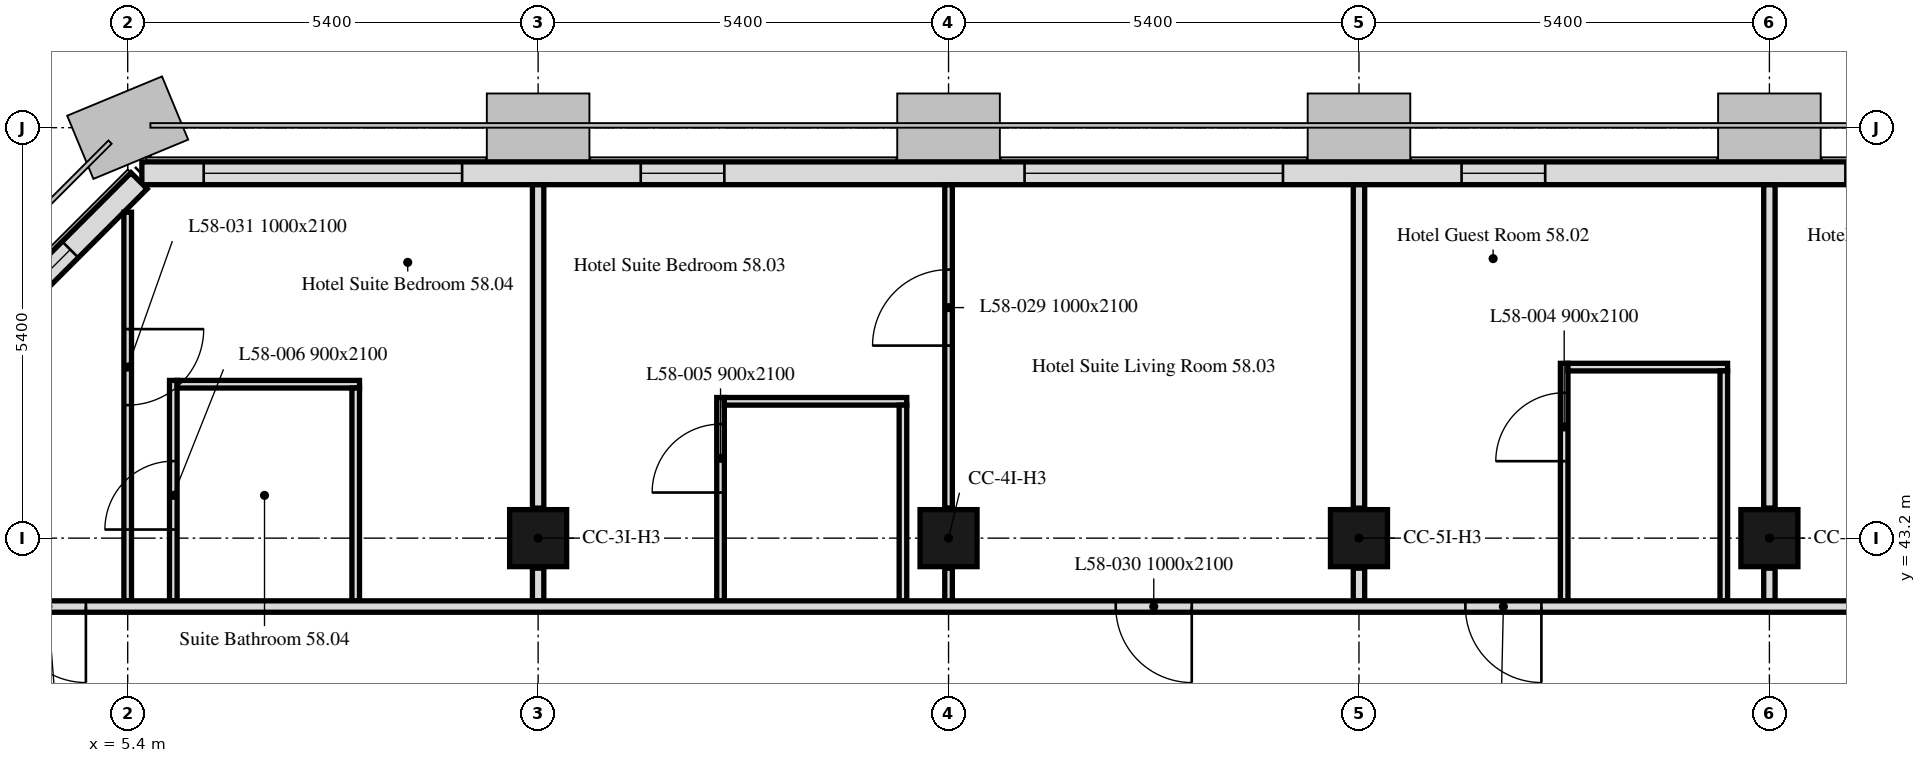
"""IFC4 building model, lengths in metres.
Left out: names, types, materials, properties, quantities, classifications, styles, units other than length and angle.
Written with IfcOpenShell. Run it as: python <this file> out.ifc"""

import sys

from ifc_helpers import new_model, si_unit, direction, frame, frame_2d, origin, origin_2d, place, context, subcontext, project, spatial, rectangle, extrude, element, fill, save


model = new_model("IFC4")
c1 = context("Model", 3, precision=1e-05, world=origin(), true_north=direction((0.0, 1.0)))
c2 = subcontext(c1, "Body", "Model", "MODEL_VIEW")
j1 = project(units=[si_unit("LENGTHUNIT", "METRE"), si_unit("PLANEANGLEUNIT", "RADIAN")], contexts=[c1])
p1 = place(None, origin())
s1 = spatial("IfcSite", under=j1, at=p1, CompositionType="ELEMENT")
p2 = place(p1, origin())
s2 = spatial("IfcBuilding", under=s1, at=p2, CompositionType="ELEMENT")
p3 = place(p2, frame((0.0, 0.0, 230.2)))
s3 = spatial("IfcBuildingStorey", under=s2, at=p3, CompositionType="ELEMENT", Elevation=230.2)
for number, where, z_axis, x_axis in (
    (1, (10.8, 43.2, 0.0), (0.0, 0.0, 1.0), (1.0, 0.0, 0.0)),
    (2, (16.2, 43.2, 0.0), (0.0, 0.0, 1.0), (1.0, 0.0, 0.0)),
    (3, (21.6, 43.2, 0.0), (0.0, 0.0, 1.0), (1.0, 0.0, 0.0)),
    (4, (27.0, 43.2, 0.0), (0.0, 0.0, 1.0), (1.0, 0.0, 0.0)),
):
    element("IfcColumn", number, at=place(p3, frame(where, z_axis=z_axis, x_axis=x_axis)), inside=s3, PredefinedType="COLUMN", context=c2, shape_type="SweptSolid", body=[
        extrude(rectangle(XDim=0.75, YDim=0.75, at=origin_2d()), origin(), (0.0, 0.0, 1.0), 2.8),
    ])
p4 = place(p3, frame((37.614, 48.0, 0.0), z_axis=(0.0, 0.0, 1.0), x_axis=(-1.0, 0.0, 0.0)))
e5 = element("IfcWall", 5, at=p4, inside=s3, PredefinedType="SOLIDWALL", context=c2, shape_type="SweptSolid", body=[
    extrude(rectangle(XDim=32.027, YDim=0.3, at=frame_2d((16.014, 0.0))), origin(), (0.0, 0.0, 1.0), 2.8),
])
p5 = place(p4, frame((2.764, 0.0, 0.9)))
e6 = element("IfcOpeningElement", 6, at=p5, cuts=e5, PredefinedType="OPENING", context=c2, shape_type="SweptSolid", body=[
    extrude(rectangle(XDim=1.1, YDim=1.7, at=frame_2d((0.55, 0.85))), frame((0.0, 0.16, 0.0), z_axis=(0.0, -1.0, 0.0), x_axis=(1.0, 0.0, 0.0)), (0.0, 0.0, 1.0), 0.32),
])
p6 = place(p4, frame((6.214, 0.0, 0.9)))
e7 = element("IfcOpeningElement", 7, at=p6, cuts=e5, PredefinedType="OPENING", context=c2, shape_type="SweptSolid", body=[
    extrude(rectangle(XDim=3.4, YDim=1.7, at=frame_2d((1.7, 0.85))), frame((0.0, 0.16, 0.0), z_axis=(0.0, -1.0, 0.0), x_axis=(1.0, 0.0, 0.0)), (0.0, 0.0, 1.0), 0.32),
])
p7 = place(p4, frame((13.564, 0.0, 0.9)))
e8 = element("IfcOpeningElement", 8, at=p7, cuts=e5, PredefinedType="OPENING", context=c2, shape_type="SweptSolid", body=[
    extrude(rectangle(XDim=1.1, YDim=1.7, at=frame_2d((0.55, 0.85))), frame((0.0, 0.16, 0.0), z_axis=(0.0, -1.0, 0.0), x_axis=(1.0, 0.0, 0.0)), (0.0, 0.0, 1.0), 0.32),
])
p8 = place(p4, frame((17.014, 0.0, 0.9)))
e9 = element("IfcOpeningElement", 9, at=p8, cuts=e5, PredefinedType="OPENING", context=c2, shape_type="SweptSolid", body=[
    extrude(rectangle(XDim=3.4, YDim=1.7, at=frame_2d((1.7, 0.85))), frame((0.0, 0.16, 0.0), z_axis=(0.0, -1.0, 0.0), x_axis=(1.0, 0.0, 0.0)), (0.0, 0.0, 1.0), 0.32),
])
p9 = place(p4, frame((24.364, 0.0, 0.9)))
e10 = element("IfcOpeningElement", 10, at=p9, cuts=e5, PredefinedType="OPENING", context=c2, shape_type="SweptSolid", body=[
    extrude(rectangle(XDim=1.1, YDim=1.7, at=frame_2d((0.55, 0.85))), frame((0.0, 0.16, 0.0), z_axis=(0.0, -1.0, 0.0), x_axis=(1.0, 0.0, 0.0)), (0.0, 0.0, 1.0), 0.32),
])
p10 = place(p4, frame((27.814, 0.0, 0.9)))
e11 = element("IfcOpeningElement", 11, at=p10, cuts=e5, PredefinedType="OPENING", context=c2, shape_type="SweptSolid", body=[
    extrude(rectangle(XDim=3.4, YDim=1.7, at=frame_2d((1.7, 0.85))), frame((0.0, 0.16, 0.0), z_axis=(0.0, -1.0, 0.0), x_axis=(1.0, 0.0, 0.0)), (0.0, 0.0, 1.0), 0.32),
])
p11 = place(p3, frame((5.55, 47.901, 0.0), z_axis=(0.0, 0.0, 1.0), x_axis=(-0.707106781187, -0.707106781187, 0.0)))
e12 = element("IfcWall", 12, at=p11, inside=s3, PredefinedType="SOLIDWALL", context=c2, shape_type="SweptSolid", body=[
    extrude(rectangle(XDim=6.86, YDim=0.3, at=frame_2d((3.43, 0.0))), origin(), (0.0, 0.0, 1.0), 2.8),
])
p12 = place(p11, frame((1.28, 0.0, 0.9)))
e13 = element("IfcOpeningElement", 13, at=p12, cuts=e12, PredefinedType="OPENING", context=c2, shape_type="SweptSolid", body=[
    extrude(rectangle(XDim=1.1, YDim=1.7, at=frame_2d((0.55, 0.85))), frame((0.0, 0.16, 0.0), z_axis=(0.0, -1.0, 0.0), x_axis=(1.0, 0.0, 0.0)), (0.0, 0.0, 1.0), 0.32),
])
p13 = place(p11, frame((4.48, 0.0, 0.9)))
e14 = element("IfcOpeningElement", 14, at=p13, cuts=e12, PredefinedType="OPENING", context=c2, shape_type="SweptSolid", body=[
    extrude(rectangle(XDim=1.1, YDim=1.7, at=frame_2d((0.55, 0.85))), frame((0.0, 0.16, 0.0), z_axis=(0.0, -1.0, 0.0), x_axis=(1.0, 0.0, 0.0)), (0.0, 0.0, 1.0), 0.32),
])
p14 = place(p3, frame((27.0, 47.849, 0.0), z_axis=(0.0, 0.0, 1.0), x_axis=(0.0, -1.0, 0.0)))
e15 = element("IfcWall", 15, at=p14, inside=s3, PredefinedType="PARTITIONING", context=c2, shape_type="SweptSolid", body=[
    extrude(rectangle(XDim=4.254, YDim=0.15, at=frame_2d((2.127, 0.0))), origin(), (0.0, 0.0, 1.0), 2.2),
])
p15 = place(p3, frame((27.0, 42.805, 0.0), z_axis=(0.0, 0.0, 1.0), x_axis=(0.0, -1.0, 0.0)))
e16 = element("IfcWall", 16, at=p15, inside=s3, PredefinedType="PARTITIONING", context=c2, shape_type="SweptSolid", body=[
    extrude(rectangle(XDim=0.43, YDim=0.15, at=frame_2d((0.215, 0.0))), origin(), (0.0, 0.0, 1.0), 2.2),
])
p16 = place(p3, frame((21.6, 47.849, 0.0), z_axis=(0.0, 0.0, 1.0), x_axis=(0.0, -1.0, 0.0)))
e17 = element("IfcWall", 17, at=p16, inside=s3, PredefinedType="PARTITIONING", context=c2, shape_type="SweptSolid", body=[
    extrude(rectangle(XDim=4.254, YDim=0.15, at=frame_2d((2.127, 0.0))), origin(), (0.0, 0.0, 1.0), 2.2),
])
p17 = place(p3, frame((21.6, 42.805, 0.0), z_axis=(0.0, 0.0, 1.0), x_axis=(0.0, -1.0, 0.0)))
e18 = element("IfcWall", 18, at=p17, inside=s3, PredefinedType="PARTITIONING", context=c2, shape_type="SweptSolid", body=[
    extrude(rectangle(XDim=0.43, YDim=0.15, at=frame_2d((0.215, 0.0))), origin(), (0.0, 0.0, 1.0), 2.2),
])
p18 = place(p3, frame((24.3, 42.375, 0.0), z_axis=(0.0, 0.0, 1.0), x_axis=(0.0, 1.0, 0.0)))
e19 = element("IfcWall", 19, at=p18, inside=s3, PredefinedType="PARTITIONING", context=c2, shape_type="SweptSolid", body=[
    extrude(rectangle(XDim=3.125, YDim=0.1, at=frame_2d((1.562, 0.0))), origin(), (0.0, 0.0, 1.0), 2.8),
])
p19 = place(p18, frame((1.837, 0.0, 0.0)))
e20 = element("IfcOpeningElement", 20, at=p19, cuts=e19, PredefinedType="OPENING", context=c2, shape_type="SweptSolid", body=[
    extrude(rectangle(XDim=0.9, YDim=2.1, at=frame_2d((0.45, 1.05))), frame((0.0, 0.05, 0.0), z_axis=(0.0, -1.0, 0.0), x_axis=(1.0, 0.0, 0.0)), (0.0, 0.0, 1.0), 0.1),
])
p20 = place(p3, frame((24.35, 45.45, 0.0), z_axis=(0.0, 0.0, 1.0), x_axis=(1.0, 0.0, 0.0)))
e21 = element("IfcWall", 21, at=p20, inside=s3, PredefinedType="PARTITIONING", context=c2, shape_type="SweptSolid", body=[
    extrude(rectangle(XDim=2.1, YDim=0.1, at=frame_2d((1.05, 0.0))), origin(), (0.0, 0.0, 1.0), 2.8),
])
p21 = place(p3, frame((26.4, 45.4, 0.0), z_axis=(0.0, 0.0, 1.0), x_axis=(0.0, -1.0, 0.0)))
e22 = element("IfcWall", 22, at=p21, inside=s3, PredefinedType="PARTITIONING", context=c2, shape_type="SweptSolid", body=[
    extrude(rectangle(XDim=3.025, YDim=0.1, at=frame_2d((1.512, 0.0))), origin(), (0.0, 0.0, 1.0), 2.8),
])
p22 = place(p3, frame((10.8, 47.849, 0.0), z_axis=(0.0, 0.0, 1.0), x_axis=(0.0, -1.0, 0.0)))
e23 = element("IfcWall", 23, at=p22, inside=s3, PredefinedType="PARTITIONING", context=c2, shape_type="SweptSolid", body=[
    extrude(rectangle(XDim=4.254, YDim=0.15, at=frame_2d((2.127, 0.0))), origin(), (0.0, 0.0, 1.0), 2.2),
])
p23 = place(p3, frame((10.8, 42.805, 0.0), z_axis=(0.0, 0.0, 1.0), x_axis=(0.0, -1.0, 0.0)))
e24 = element("IfcWall", 24, at=p23, inside=s3, PredefinedType="PARTITIONING", context=c2, shape_type="SweptSolid", body=[
    extrude(rectangle(XDim=0.43, YDim=0.15, at=frame_2d((0.215, 0.0))), origin(), (0.0, 0.0, 1.0), 2.2),
])
p24 = place(p3, frame((13.2, 42.375, 0.0), z_axis=(0.0, 0.0, 1.0), x_axis=(0.0, 1.0, 0.0)))
e25 = element("IfcWall", 25, at=p24, inside=s3, PredefinedType="PARTITIONING", context=c2, shape_type="SweptSolid", body=[
    extrude(rectangle(XDim=2.675, YDim=0.1, at=frame_2d((1.337, 0.0))), origin(), (0.0, 0.0, 1.0), 2.8),
])
p25 = place(p24, frame((1.425, 0.0, 0.0)))
e26 = element("IfcOpeningElement", 26, at=p25, cuts=e25, PredefinedType="OPENING", context=c2, shape_type="SweptSolid", body=[
    extrude(rectangle(XDim=0.9, YDim=2.1, at=frame_2d((0.45, 1.05))), frame((0.0, 0.05, 0.0), z_axis=(0.0, -1.0, 0.0), x_axis=(1.0, 0.0, 0.0)), (0.0, 0.0, 1.0), 0.1),
])
p26 = place(p3, frame((13.25, 45.0, 0.0), z_axis=(0.0, 0.0, 1.0), x_axis=(1.0, 0.0, 0.0)))
e27 = element("IfcWall", 27, at=p26, inside=s3, PredefinedType="PARTITIONING", context=c2, shape_type="SweptSolid", body=[
    extrude(rectangle(XDim=2.4, YDim=0.1, at=frame_2d((1.2, 0.0))), origin(), (0.0, 0.0, 1.0), 2.8),
])
p27 = place(p3, frame((15.6, 44.95, 0.0), z_axis=(0.0, 0.0, 1.0), x_axis=(0.0, -1.0, 0.0)))
e28 = element("IfcWall", 28, at=p27, inside=s3, PredefinedType="PARTITIONING", context=c2, shape_type="SweptSolid", body=[
    extrude(rectangle(XDim=2.575, YDim=0.1, at=frame_2d((1.288, 0.0))), origin(), (0.0, 0.0, 1.0), 2.8),
])
p28 = place(p3, frame((16.2, 42.375, 0.0), z_axis=(0.0, 0.0, 1.0), x_axis=(0.0, 1.0, 0.0)))
e29 = element("IfcWall", 29, at=p28, inside=s3, PredefinedType="PARTITIONING", context=c2, shape_type="SweptSolid", body=[
    extrude(rectangle(XDim=0.43, YDim=0.1, at=frame_2d((0.215, 0.0))), origin(), (0.0, 0.0, 1.0), 2.2),
])
p29 = place(p3, frame((16.2, 43.595, 0.0), z_axis=(0.0, 0.0, 1.0), x_axis=(0.0, 1.0, 0.0)))
e30 = element("IfcWall", 30, at=p29, inside=s3, PredefinedType="PARTITIONING", context=c2, shape_type="SweptSolid", body=[
    extrude(rectangle(XDim=4.254, YDim=0.1, at=frame_2d((2.127, 0.0))), origin(), (0.0, 0.0, 1.0), 2.2),
])
p30 = place(p29, frame((2.138, 0.0, 0.0)))
e31 = element("IfcOpeningElement", 31, at=p30, cuts=e30, PredefinedType="OPENING", context=c2, shape_type="SweptSolid", body=[
    extrude(rectangle(XDim=1.0, YDim=2.1, at=frame_2d((0.5, 1.05))), frame((0.0, 0.05, 0.0), z_axis=(0.0, -1.0, 0.0), x_axis=(1.0, 0.0, 0.0)), (0.0, 0.0, 1.0), 0.1),
])
p31 = place(p3, frame((5.4, 47.488, 0.0), z_axis=(0.0, 0.0, 1.0), x_axis=(0.0, -1.0, 0.0)))
e32 = element("IfcWall", 32, at=p31, inside=s3, PredefinedType="PARTITIONING", context=c2, shape_type="SweptSolid", body=[
    extrude(rectangle(XDim=5.113, YDim=0.1, at=frame_2d((2.556, 0.0))), origin(), (0.0, 0.0, 1.0), 2.8),
])
p32 = place(p31, frame((1.538, 0.0, 0.0)))
e33 = element("IfcOpeningElement", 33, at=p32, cuts=e32, PredefinedType="OPENING", context=c2, shape_type="SweptSolid", body=[
    extrude(rectangle(XDim=1.0, YDim=2.1, at=frame_2d((0.5, 1.05))), frame((0.0, 0.05, 0.0), z_axis=(0.0, -1.0, 0.0), x_axis=(1.0, 0.0, 0.0)), (0.0, 0.0, 1.0), 0.1),
])
p33 = place(p3, frame((6.0, 42.375, 0.0), z_axis=(0.0, 0.0, 1.0), x_axis=(0.0, 1.0, 0.0)))
e34 = element("IfcWall", 34, at=p33, inside=s3, PredefinedType="PARTITIONING", context=c2, shape_type="SweptSolid", body=[
    extrude(rectangle(XDim=2.9, YDim=0.1, at=frame_2d((1.45, 0.0))), origin(), (0.0, 0.0, 1.0), 2.8),
])
p34 = place(p33, frame((0.938, 0.0, 0.0)))
e35 = element("IfcOpeningElement", 35, at=p34, cuts=e34, PredefinedType="OPENING", context=c2, shape_type="SweptSolid", body=[
    extrude(rectangle(XDim=0.9, YDim=2.1, at=frame_2d((0.45, 1.05))), frame((0.0, 0.05, 0.0), z_axis=(0.0, -1.0, 0.0), x_axis=(1.0, 0.0, 0.0)), (0.0, 0.0, 1.0), 0.1),
])
p35 = place(p3, frame((6.05, 45.225, 0.0), z_axis=(0.0, 0.0, 1.0), x_axis=(1.0, 0.0, 0.0)))
e36 = element("IfcWall", 36, at=p35, inside=s3, PredefinedType="PARTITIONING", context=c2, shape_type="SweptSolid", body=[
    extrude(rectangle(XDim=2.4, YDim=0.1, at=frame_2d((1.2, 0.0))), origin(), (0.0, 0.0, 1.0), 2.8),
])
p36 = place(p3, frame((8.4, 45.175, 0.0), z_axis=(0.0, 0.0, 1.0), x_axis=(0.0, -1.0, 0.0)))
e37 = element("IfcWall", 37, at=p36, inside=s3, PredefinedType="PARTITIONING", context=c2, shape_type="SweptSolid", body=[
    extrude(rectangle(XDim=2.8, YDim=0.1, at=frame_2d((1.4, 0.0))), origin(), (0.0, 0.0, 1.0), 2.8),
])
p37 = place(p3, frame((42.449, 42.3, 0.0), z_axis=(0.0, 0.0, 1.0), x_axis=(-1.0, 0.0, 0.0)))
e38 = element("IfcWall", 38, at=p37, inside=s3, PredefinedType="PARTITIONING", context=c2, shape_type="SweptSolid", body=[
    extrude(rectangle(XDim=41.698, YDim=0.15, at=frame_2d((20.849, 0.0))), origin(), (0.0, 0.0, 1.0), 2.2),
])
p38 = place(p37, frame((1.132, 0.0, 0.0)))
e39 = element("IfcOpeningElement", 39, at=p38, cuts=e38, PredefinedType="OPENING", context=c2, shape_type="SweptSolid", body=[
    extrude(rectangle(XDim=1.0, YDim=2.1, at=frame_2d((0.5, 1.05))), frame((0.0, 0.075, 0.0), z_axis=(0.0, -1.0, 0.0), x_axis=(1.0, 0.0, 0.0)), (0.0, 0.0, 1.0), 0.15),
])
p39 = place(p37, frame((13.049, 0.0, 0.0)))
e40 = element("IfcOpeningElement", 40, at=p39, cuts=e38, PredefinedType="OPENING", context=c2, shape_type="SweptSolid", body=[
    extrude(rectangle(XDim=1.0, YDim=2.1, at=frame_2d((0.5, 1.05))), frame((0.0, 0.075, 0.0), z_axis=(0.0, -1.0, 0.0), x_axis=(1.0, 0.0, 0.0)), (0.0, 0.0, 1.0), 0.15),
])
p40 = place(p37, frame((18.449, 0.0, 0.0)))
e41 = element("IfcOpeningElement", 41, at=p40, cuts=e38, PredefinedType="OPENING", context=c2, shape_type="SweptSolid", body=[
    extrude(rectangle(XDim=1.0, YDim=2.1, at=frame_2d((0.5, 1.05))), frame((0.0, 0.075, 0.0), z_axis=(0.0, -1.0, 0.0), x_axis=(1.0, 0.0, 0.0)), (0.0, 0.0, 1.0), 0.15),
])
p41 = place(p37, frame((23.049, 0.0, 0.0)))
e42 = element("IfcOpeningElement", 42, at=p41, cuts=e38, PredefinedType="OPENING", context=c2, shape_type="SweptSolid", body=[
    extrude(rectangle(XDim=1.0, YDim=2.1, at=frame_2d((0.5, 1.05))), frame((0.0, 0.075, 0.0), z_axis=(0.0, -1.0, 0.0), x_axis=(1.0, 0.0, 0.0)), (0.0, 0.0, 1.0), 0.15),
])
p42 = place(p37, frame((37.599, 0.0, 0.0)))
e43 = element("IfcOpeningElement", 43, at=p42, cuts=e38, PredefinedType="OPENING", context=c2, shape_type="SweptSolid", body=[
    extrude(rectangle(XDim=1.0, YDim=2.1, at=frame_2d((0.5, 1.05))), frame((0.0, 0.075, 0.0), z_axis=(0.0, -1.0, 0.0), x_axis=(1.0, 0.0, 0.0)), (0.0, 0.0, 1.0), 0.15),
])
p43 = place(p7, origin())
e44 = element("IfcWindow", 44, at=p43, inside=s3, PartitioningType="SINGLE_PANEL", PredefinedType="WINDOW", context=c2, shape_type="SweptSolid", body=[
    extrude(rectangle(XDim=1.1, YDim=1.7, at=frame_2d((0.55, 0.85))), frame((0.0, 0.03, 0.0), z_axis=(0.0, -1.0, 0.0), x_axis=(1.0, 0.0, 0.0)), (0.0, 0.0, 1.0), 0.06),
])
fill(e8, e44)
p44 = place(p8, origin())
e45 = element("IfcWindow", 45, at=p44, inside=s3, PartitioningType="SINGLE_PANEL", PredefinedType="WINDOW", context=c2, shape_type="SweptSolid", body=[
    extrude(rectangle(XDim=3.4, YDim=1.7, at=frame_2d((1.7, 0.85))), frame((0.0, 0.03, 0.0), z_axis=(0.0, -1.0, 0.0), x_axis=(1.0, 0.0, 0.0)), (0.0, 0.0, 1.0), 0.06),
])
fill(e9, e45)
p45 = place(p9, origin())
e46 = element("IfcWindow", 46, at=p45, inside=s3, PartitioningType="SINGLE_PANEL", PredefinedType="WINDOW", context=c2, shape_type="SweptSolid", body=[
    extrude(rectangle(XDim=1.1, YDim=1.7, at=frame_2d((0.55, 0.85))), frame((0.0, 0.03, 0.0), z_axis=(0.0, -1.0, 0.0), x_axis=(1.0, 0.0, 0.0)), (0.0, 0.0, 1.0), 0.06),
])
fill(e10, e46)
p46 = place(p10, origin())
e47 = element("IfcWindow", 47, at=p46, inside=s3, PartitioningType="SINGLE_PANEL", PredefinedType="WINDOW", context=c2, shape_type="SweptSolid", body=[
    extrude(rectangle(XDim=3.4, YDim=1.7, at=frame_2d((1.7, 0.85))), frame((0.0, 0.03, 0.0), z_axis=(0.0, -1.0, 0.0), x_axis=(1.0, 0.0, 0.0)), (0.0, 0.0, 1.0), 0.06),
])
fill(e11, e47)
p47 = place(p12, origin())
e48 = element("IfcWindow", 48, at=p47, inside=s3, PartitioningType="SINGLE_PANEL", PredefinedType="WINDOW", context=c2, shape_type="SweptSolid", body=[
    extrude(rectangle(XDim=1.1, YDim=1.7, at=frame_2d((0.55, 0.85))), frame((0.0, 0.03, 0.0), z_axis=(0.0, -1.0, 0.0), x_axis=(1.0, 0.0, 0.0)), (0.0, 0.0, 1.0), 0.06),
])
fill(e13, e48)
p48 = place(p19, origin())
e49 = element("IfcDoor", 49, at=p48, inside=s3, OperationType="SINGLE_SWING_RIGHT", PredefinedType="DOOR", context=c2, shape_type="SweptSolid", body=[
    extrude(rectangle(XDim=0.9, YDim=2.1, at=frame_2d((0.45, 1.05))), frame((0.0, 0.025, 0.0), z_axis=(0.0, -1.0, 0.0), x_axis=(1.0, 0.0, 0.0)), (0.0, 0.0, 1.0), 0.05),
])
fill(e20, e49)
p49 = place(p25, origin())
e50 = element("IfcDoor", 50, at=p49, inside=s3, OperationType="SINGLE_SWING_RIGHT", PredefinedType="DOOR", context=c2, shape_type="SweptSolid", body=[
    extrude(rectangle(XDim=0.9, YDim=2.1, at=frame_2d((0.45, 1.05))), frame((0.0, 0.025, 0.0), z_axis=(0.0, -1.0, 0.0), x_axis=(1.0, 0.0, 0.0)), (0.0, 0.0, 1.0), 0.05),
])
fill(e26, e50)
p50 = place(p34, origin())
e51 = element("IfcDoor", 51, at=p50, inside=s3, OperationType="SINGLE_SWING_LEFT", PredefinedType="DOOR", context=c2, shape_type="SweptSolid", body=[
    extrude(rectangle(XDim=0.9, YDim=2.1, at=frame_2d((0.45, 1.05))), frame((0.0, 0.025, 0.0), z_axis=(0.0, -1.0, 0.0), x_axis=(1.0, 0.0, 0.0)), (0.0, 0.0, 1.0), 0.05),
])
fill(e35, e51)
p51 = place(p40, origin())
e52 = element("IfcDoor", 52, at=p51, inside=s3, OperationType="SINGLE_SWING_RIGHT", PredefinedType="DOOR", context=c2, shape_type="SweptSolid", body=[
    extrude(rectangle(XDim=1.0, YDim=2.1, at=frame_2d((0.5, 1.05))), frame((0.0, 0.025, 0.0), z_axis=(0.0, -1.0, 0.0), x_axis=(1.0, 0.0, 0.0)), (0.0, 0.0, 1.0), 0.05),
])
fill(e41, e52)
p52 = place(p30, origin())
e53 = element("IfcDoor", 53, at=p52, inside=s3, OperationType="SINGLE_SWING_RIGHT", PredefinedType="DOOR", context=c2, shape_type="SweptSolid", body=[
    extrude(rectangle(XDim=1.0, YDim=2.1, at=frame_2d((0.5, 1.05))), frame((0.0, 0.025, 0.0), z_axis=(0.0, -1.0, 0.0), x_axis=(1.0, 0.0, 0.0)), (0.0, 0.0, 1.0), 0.05),
])
fill(e31, e53)
p53 = place(p41, origin())
e54 = element("IfcDoor", 54, at=p53, inside=s3, OperationType="SINGLE_SWING_RIGHT", PredefinedType="DOOR", context=c2, shape_type="SweptSolid", body=[
    extrude(rectangle(XDim=1.0, YDim=2.1, at=frame_2d((0.5, 1.05))), frame((0.0, 0.025, 0.0), z_axis=(0.0, -1.0, 0.0), x_axis=(1.0, 0.0, 0.0)), (0.0, 0.0, 1.0), 0.05),
])
fill(e42, e54)
p54 = place(p32, origin())
e55 = element("IfcDoor", 55, at=p54, inside=s3, OperationType="SINGLE_SWING_LEFT", PredefinedType="DOOR", context=c2, shape_type="SweptSolid", body=[
    extrude(rectangle(XDim=1.0, YDim=2.1, at=frame_2d((0.5, 1.05))), frame((0.0, 0.025, 0.0), z_axis=(0.0, -1.0, 0.0), x_axis=(1.0, 0.0, 0.0)), (0.0, 0.0, 1.0), 0.05),
])
fill(e33, e55)
p55 = place(p42, origin())
e56 = element("IfcDoor", 56, at=p55, inside=s3, OperationType="SINGLE_SWING_RIGHT", PredefinedType="DOOR", context=c2, shape_type="SweptSolid", body=[
    extrude(rectangle(XDim=1.0, YDim=2.1, at=frame_2d((0.5, 1.05))), frame((0.0, 0.025, 0.0), z_axis=(0.0, -1.0, 0.0), x_axis=(1.0, 0.0, 0.0)), (0.0, 0.0, 1.0), 0.05),
])
fill(e43, e56)
save(model, sys.argv[1])
